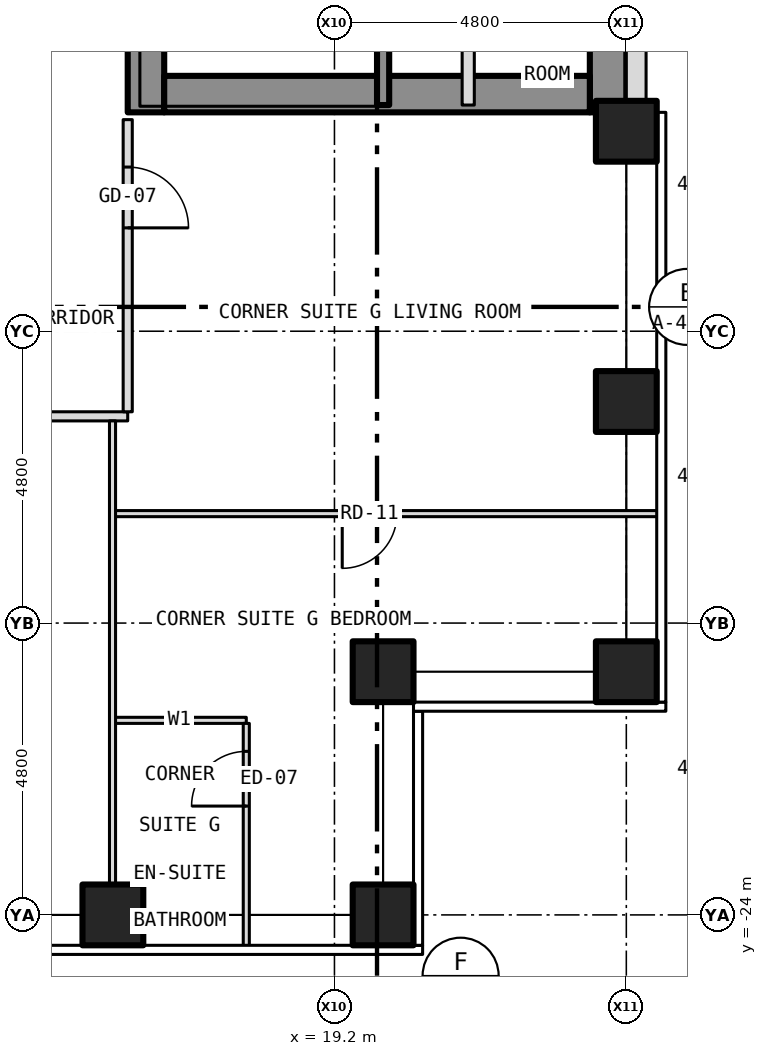
"""IFC4 building model, lengths in metres.
Left out: names, types, materials, properties, quantities, classifications, styles, units other than length and angle.
Written with IfcOpenShell. Run it as: python <this file> out.ifc"""

import sys

from ifc_helpers import new_model, si_unit, direction, frame, frame_2d, origin, origin_2d, place, context, subcontext, project, spatial, rectangle, hollow_rectangle, extrude, element, fill, save


model = new_model("IFC4")
c1 = context("Model", 3, precision=1e-05, world=origin(), true_north=direction((0.0, 1.0)))
c2 = subcontext(c1, "Body", "Model", "MODEL_VIEW")
j1 = project(units=[si_unit("LENGTHUNIT", "METRE"), si_unit("PLANEANGLEUNIT", "RADIAN")], contexts=[c1])
p1 = place(None, origin())
s1 = spatial("IfcSite", under=j1, at=p1, CompositionType="ELEMENT")
p2 = place(p1, origin())
s2 = spatial("IfcBuilding", under=s1, at=p2, CompositionType="ELEMENT")
p3 = place(p2, frame((0.0, 0.0, 81.0)))
s3 = spatial("IfcBuildingStorey", under=s2, at=p3, CompositionType="ELEMENT", Elevation=81.0)
for number, where, z_axis, x_axis in (
    (1, (15.556, -24.0, -0.15), (0.0, 0.0, 1.0), (1.0, 0.0, 0.0)),
    (2, (20.0, -24.0, -0.15), (0.0, 0.0, 1.0), (1.0, 0.0, 0.0)),
    (3, (24.0, -20.0, -0.15), (0.0, 0.0, 1.0), (1.0, 0.0, 0.0)),
    (4, (24.0, -15.556, -0.15), (0.0, 0.0, 1.0), (1.0, 0.0, 0.0)),
    (5, (24.0, -11.111, -0.15), (0.0, 0.0, 1.0), (1.0, 0.0, 0.0)),
    (6, (20.0, -20.0, -0.15), (0.0, 0.0, 1.0), (1.0, 0.0, 0.0)),
):
    element("IfcColumn", number, at=place(p3, frame(where, z_axis=z_axis, x_axis=x_axis)), inside=s3, PredefinedType="COLUMN", context=c2, shape_type="SweptSolid", body=[
        extrude(hollow_rectangle(XDim=1.0, YDim=1.0, WallThickness=0.06, at=origin_2d()), origin(), (0.0, 0.0, 1.0), 3.35),
    ])
p4 = place(p3, frame((16.1, -10.8, 0.0), z_axis=(0.0, 0.0, 1.0), x_axis=(0.0, 1.0, 0.0)))
e7 = element("IfcWall", 7, at=p4, inside=s3, PredefinedType="SHEAR", context=c2, shape_type="SweptSolid", body=[
    extrude(rectangle(XDim=21.6, YDim=0.6, at=frame_2d((10.8, 0.0))), origin(), (0.0, 0.0, 1.0), 2.9),
])
p5 = place(p4, frame((9.4, 0.0, 0.0)))
e8 = element("IfcOpeningElement", 8, at=p5, cuts=e7, PredefinedType="OPENING", context=c2, shape_type="SweptSolid", body=[
    extrude(rectangle(XDim=1.1, YDim=2.1, at=frame_2d((0.55, 1.05))), frame((0.0, 0.312, 0.0), z_axis=(0.0, -1.0, 0.0), x_axis=(1.0, 0.0, 0.0)), (0.0, 0.0, 1.0), 0.624),
])
p6 = place(p4, frame((11.5, 0.0, 0.0)))
e9 = element("IfcOpeningElement", 9, at=p6, cuts=e7, PredefinedType="OPENING", context=c2, shape_type="SweptSolid", body=[
    extrude(rectangle(XDim=1.1, YDim=2.1, at=frame_2d((0.55, 1.05))), frame((0.0, 0.312, 0.0), z_axis=(0.0, -1.0, 0.0), x_axis=(1.0, 0.0, 0.0)), (0.0, 0.0, 1.0), 0.624),
])
p7 = place(p4, frame((13.6, 0.0, 0.0)))
e10 = element("IfcOpeningElement", 10, at=p7, cuts=e7, PredefinedType="OPENING", context=c2, shape_type="SweptSolid", body=[
    extrude(rectangle(XDim=1.1, YDim=2.1, at=frame_2d((0.55, 1.05))), frame((0.0, 0.312, 0.0), z_axis=(0.0, -1.0, 0.0), x_axis=(1.0, 0.0, 0.0)), (0.0, 0.0, 1.0), 0.624),
])
p8 = place(p4, frame((15.7, 0.0, 0.0)))
e11 = element("IfcOpeningElement", 11, at=p8, cuts=e7, PredefinedType="OPENING", context=c2, shape_type="SweptSolid", body=[
    extrude(rectangle(XDim=1.1, YDim=2.1, at=frame_2d((0.55, 1.05))), frame((0.0, 0.312, 0.0), z_axis=(0.0, -1.0, 0.0), x_axis=(1.0, 0.0, 0.0)), (0.0, 0.0, 1.0), 0.624),
])
p9 = place(p4, frame((17.8, 0.0, 0.0)))
e12 = element("IfcOpeningElement", 12, at=p9, cuts=e7, PredefinedType="OPENING", context=c2, shape_type="SweptSolid", body=[
    extrude(rectangle(XDim=1.1, YDim=2.1, at=frame_2d((0.55, 1.05))), frame((0.0, 0.312, 0.0), z_axis=(0.0, -1.0, 0.0), x_axis=(1.0, 0.0, 0.0)), (0.0, 0.0, 1.0), 0.624),
])
p10 = place(p4, frame((5.642, 0.0, 0.0)))
e13 = element("IfcOpeningElement", 13, at=p10, cuts=e7, PredefinedType="OPENING", context=c2, shape_type="SweptSolid", body=[
    extrude(rectangle(XDim=1.1, YDim=2.1, at=frame_2d((0.55, 1.05))), frame((0.0, 0.312, 0.0), z_axis=(0.0, -1.0, 0.0), x_axis=(1.0, 0.0, 0.0)), (0.0, 0.0, 1.0), 0.624),
])
p11 = place(p4, frame((7.5, 0.0, 0.0)))
e14 = element("IfcOpeningElement", 14, at=p11, cuts=e7, PredefinedType="OPENING", context=c2, shape_type="SweptSolid", body=[
    extrude(rectangle(XDim=1.1, YDim=2.1, at=frame_2d((0.55, 1.05))), frame((0.0, 0.312, 0.0), z_axis=(0.0, -1.0, 0.0), x_axis=(1.0, 0.0, 0.0)), (0.0, 0.0, 1.0), 0.624),
])
p12 = place(p3, frame((23.7, -10.8, 0.0), z_axis=(0.0, 0.0, 1.0), x_axis=(0.0, 1.0, 0.0)))
e15 = element("IfcWall", 15, at=p12, inside=s3, PredefinedType="SHEAR", context=c2, shape_type="SweptSolid", body=[
    extrude(rectangle(XDim=21.6, YDim=0.6, at=frame_2d((10.8, 0.0))), origin(), (0.0, 0.0, 1.0), 2.9),
])
p13 = place(p3, frame((16.4, -10.5, 0.0), z_axis=(0.0, 0.0, 1.0), x_axis=(1.0, 0.0, 0.0)))
e16 = element("IfcWall", 16, at=p13, inside=s3, PredefinedType="SHEAR", context=c2, shape_type="SweptSolid", body=[
    extrude(rectangle(XDim=7.0, YDim=0.6, at=frame_2d((3.5, 0.0))), origin(), (0.0, 0.0, 1.0), 2.9),
])
p14 = place(p3, frame((24.163, -10.8, 0.0), z_axis=(0.0, 0.0, 1.0), x_axis=(0.0, 1.0, 0.0)))
e17 = element("IfcWall", 17, at=p14, inside=s3, PredefinedType="SOLIDWALL", context=c2, shape_type="SweptSolid", body=[
    extrude(rectangle(XDim=21.6, YDim=0.325, at=frame_2d((10.8, 0.0))), origin(), (0.0, 0.0, 1.0), 3.5),
])
p15 = place(p14, frame((2.95, 0.0, 1.0)))
e18 = element("IfcOpeningElement", 18, at=p15, cuts=e17, PredefinedType="OPENING", context=c2, shape_type="SweptSolid", body=[
    extrude(rectangle(XDim=0.6, YDim=1.5, at=frame_2d((0.3, 0.75))), frame((0.0, 0.175, 0.0), z_axis=(0.0, -1.0, 0.0), x_axis=(1.0, 0.0, 0.0)), (0.0, 0.0, 1.0), 0.349),
])
p16 = place(p3, frame((15.55, -20.8, 0.0), z_axis=(0.0, 0.0, 1.0), x_axis=(1.0, 0.0, 0.0)))
e19 = element("IfcWall", 19, at=p16, inside=s3, PredefinedType="PARTITIONING", context=c2, shape_type="SweptSolid", body=[
    extrude(rectangle(XDim=2.2, YDim=0.1, at=frame_2d((1.1, 0.0))), origin(), (0.0, 0.0, 1.0), 3.2),
])
p17 = place(p3, frame((15.55, -17.4, 0.0), z_axis=(0.0, 0.0, 1.0), x_axis=(1.0, 0.0, 0.0)))
e20 = element("IfcWall", 20, at=p17, inside=s3, PredefinedType="PARTITIONING", context=c2, shape_type="SweptSolid", body=[
    extrude(rectangle(XDim=8.98, YDim=0.1, at=frame_2d((4.49, 0.0))), origin(), (0.0, 0.0, 1.0), 3.2),
])
p18 = place(p17, frame((3.778, 0.0, 0.0)))
e21 = element("IfcOpeningElement", 21, at=p18, cuts=e20, PredefinedType="OPENING", context=c2, shape_type="SweptSolid", body=[
    extrude(rectangle(XDim=0.9, YDim=2.1, at=frame_2d((0.45, 1.05))), frame((0.0, 0.062, 0.0), z_axis=(0.0, -1.0, 0.0), x_axis=(1.0, 0.0, 0.0)), (0.0, 0.0, 1.0), 0.124),
])
p19 = place(p3, frame((9.15, -15.8, 0.0), z_axis=(0.0, 0.0, 1.0), x_axis=(1.0, 0.0, 0.0)))
e22 = element("IfcWall", 22, at=p19, inside=s3, PredefinedType="PARTITIONING", context=c2, shape_type="SweptSolid", body=[
    extrude(rectangle(XDim=6.65, YDim=0.15, at=frame_2d((3.325, 0.0))), origin(), (0.0, 0.0, 1.0), 3.2),
])
p20 = place(p19, frame((3.803, 0.0, 0.0)))
e23 = element("IfcOpeningElement", 23, at=p20, cuts=e22, PredefinedType="OPENING", context=c2, shape_type="SweptSolid", body=[
    extrude(rectangle(XDim=1.0, YDim=2.1, at=frame_2d((0.5, 1.05))), frame((0.0, 0.087, 0.0), z_axis=(0.0, -1.0, 0.0), x_axis=(1.0, 0.0, 0.0)), (0.0, 0.0, 1.0), 0.174),
])
p21 = place(p3, frame((15.55, -23.88, 0.0), z_axis=(0.0, 0.0, 1.0), x_axis=(0.0, 1.0, 0.0)))
e24 = element("IfcWall", 24, at=p21, inside=s3, PredefinedType="PARTITIONING", context=c2, shape_type="SweptSolid", body=[
    extrude(rectangle(XDim=8.005, YDim=0.1, at=frame_2d((4.002, 0.0))), origin(), (0.0, 0.0, 1.0), 3.2),
])
p22 = place(p3, frame((15.8, -15.725, 0.0), z_axis=(0.0, 0.0, 1.0), x_axis=(0.0, 1.0, 0.0)))
e25 = element("IfcWall", 25, at=p22, inside=s3, PredefinedType="PARTITIONING", context=c2, shape_type="SweptSolid", body=[
    extrude(rectangle(XDim=4.805, YDim=0.15, at=frame_2d((2.403, 0.0))), origin(), (0.0, 0.0, 1.0), 3.2),
])
p23 = place(p22, frame((3.025, 0.0, 0.0)))
e26 = element("IfcOpeningElement", 26, at=p23, cuts=e25, PredefinedType="OPENING", context=c2, shape_type="SweptSolid", body=[
    extrude(rectangle(XDim=1.0, YDim=2.1, at=frame_2d((0.5, 1.05))), frame((0.0, 0.087, 0.0), z_axis=(0.0, -1.0, 0.0), x_axis=(1.0, 0.0, 0.0)), (0.0, 0.0, 1.0), 0.174),
])
p24 = place(p3, frame((17.75, -24.53, 0.0), z_axis=(0.0, 0.0, 1.0), x_axis=(0.0, 1.0, 0.0)))
e27 = element("IfcWall", 27, at=p24, inside=s3, PredefinedType="PARTITIONING", context=c2, shape_type="SweptSolid", body=[
    extrude(rectangle(XDim=3.68, YDim=0.1, at=frame_2d((1.84, 0.0))), origin(), (0.0, 0.0, 1.0), 3.2),
])
p25 = place(p24, frame((2.32, 0.0, 0.0)))
e28 = element("IfcOpeningElement", 28, at=p25, cuts=e27, PredefinedType="OPENING", context=c2, shape_type="SweptSolid", body=[
    extrude(rectangle(XDim=0.9, YDim=2.1, at=frame_2d((0.45, 1.05))), frame((0.0, 0.062, 0.0), z_axis=(0.0, -1.0, 0.0), x_axis=(1.0, 0.0, 0.0)), (0.0, 0.0, 1.0), 0.124),
])
p26 = place(p3, frame((20.0, -10.68, 0.0), z_axis=(0.0, 0.0, 1.0), x_axis=(0.0, 1.0, 0.0)))
e29 = element("IfcWall", 29, at=p26, inside=s3, PredefinedType="SHEAR", context=c2, shape_type="SweptSolid", body=[
    extrude(rectangle(XDim=6.98, YDim=0.2, at=frame_2d((3.49, 0.0))), origin(), (0.0, 0.0, 1.0), 2.9),
])
p27 = place(p3, frame((21.4, -10.68, 0.0), z_axis=(0.0, 0.0, 1.0), x_axis=(0.0, 1.0, 0.0)))
e30 = element("IfcWall", 30, at=p27, inside=s3, PredefinedType="PARTITIONING", context=c2, shape_type="SweptSolid", body=[
    extrude(rectangle(XDim=8.68, YDim=0.2, at=frame_2d((4.34, 0.0))), origin(), (0.0, 0.0, 1.0), 2.9),
])
p28 = place(p27, frame((1.21, 0.0, 0.0)))
e31 = element("IfcOpeningElement", 31, at=p28, cuts=e30, PredefinedType="OPENING", context=c2, shape_type="SweptSolid", body=[
    extrude(rectangle(XDim=0.9, YDim=2.1, at=frame_2d((0.45, 1.05))), frame((0.0, 0.112, 0.0), z_axis=(0.0, -1.0, 0.0), x_axis=(1.0, 0.0, 0.0)), (0.0, 0.0, 1.0), 0.224),
])
p29 = place(p27, frame((5.66, 0.0, 0.0)))
e32 = element("IfcOpeningElement", 32, at=p29, cuts=e30, PredefinedType="OPENING", context=c2, shape_type="SweptSolid", body=[
    extrude(rectangle(XDim=0.9, YDim=2.1, at=frame_2d((0.45, 1.05))), frame((0.0, 0.112, 0.0), z_axis=(0.0, -1.0, 0.0), x_axis=(1.0, 0.0, 0.0)), (0.0, 0.0, 1.0), 0.224),
])
p30 = place(p23, origin())
e33 = element("IfcDoor", 33, at=p30, inside=s3, OperationType="SINGLE_SWING_LEFT", PredefinedType="DOOR", context=c2, shape_type="SweptSolid", body=[
    extrude(rectangle(XDim=1.0, YDim=2.1, at=frame_2d((0.5, 1.05))), frame((0.0, 0.025, 0.0), z_axis=(0.0, -1.0, 0.0), x_axis=(1.0, 0.0, 0.0)), (0.0, 0.0, 1.0), 0.05),
])
fill(e26, e33)
p31 = place(p18, origin())
e34 = element("IfcDoor", 34, at=p31, inside=s3, OperationType="SINGLE_SWING_LEFT", PredefinedType="DOOR", context=c2, shape_type="SweptSolid", body=[
    extrude(rectangle(XDim=0.9, YDim=2.1, at=frame_2d((0.45, 1.05))), frame((0.0, 0.025, 0.0), z_axis=(0.0, -1.0, 0.0), x_axis=(1.0, 0.0, 0.0)), (0.0, 0.0, 1.0), 0.05),
])
fill(e21, e34)
p32 = place(p25, origin())
e35 = element("IfcDoor", 35, at=p32, inside=s3, OperationType="SINGLE_SWING_LEFT", PredefinedType="DOOR", context=c2, shape_type="SweptSolid", body=[
    extrude(rectangle(XDim=0.9, YDim=2.1, at=frame_2d((0.45, 1.05))), frame((0.0, 0.025, 0.0), z_axis=(0.0, -1.0, 0.0), x_axis=(1.0, 0.0, 0.0)), (0.0, 0.0, 1.0), 0.05),
])
fill(e28, e35)
save(model, sys.argv[1])
